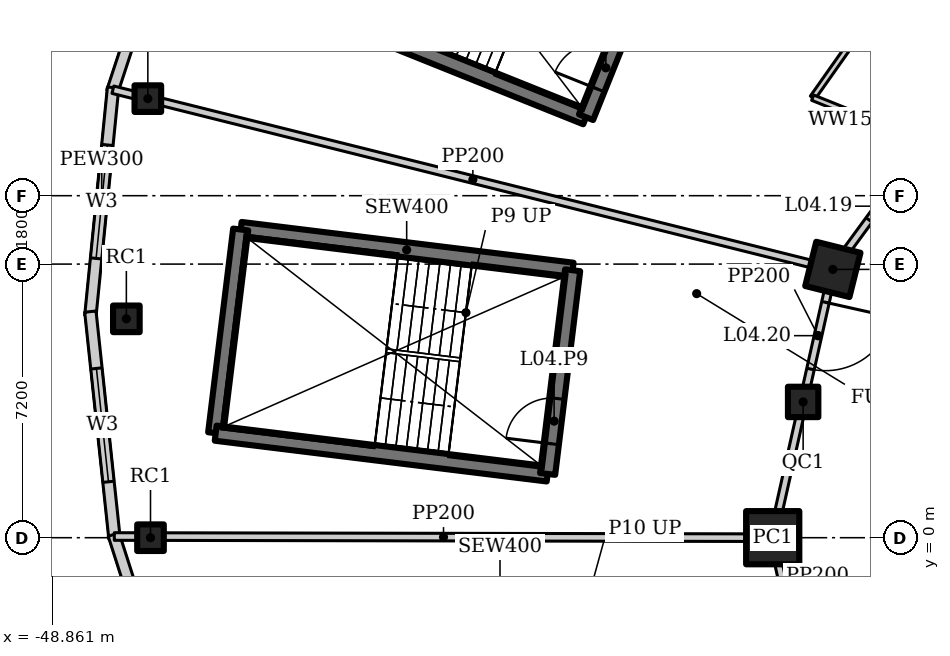
"""IFC4 building model, lengths in metres.
Left out: names, types, materials, properties, quantities, classifications, styles, units other than length and angle.
Written with IfcOpenShell. Run it as: python <this file> out.ifc"""

import sys

from ifc_helpers import new_model, si_unit, direction, frame, frame_2d, origin, origin_2d, place, context, subcontext, project, spatial, rectangle, hollow_rectangle, extrude, element, fill, save


model = new_model("IFC4")
c1 = context("Model", 3, precision=1e-05, world=origin(), true_north=direction((0.0, 1.0)))
c2 = subcontext(c1, "Body", "Model", "MODEL_VIEW")
j1 = project(units=[si_unit("LENGTHUNIT", "METRE"), si_unit("PLANEANGLEUNIT", "RADIAN")], contexts=[c1])
p1 = place(None, origin())
s1 = spatial("IfcSite", under=j1, at=p1, CompositionType="ELEMENT")
p2 = place(p1, origin())
s2 = spatial("IfcBuilding", under=s1, at=p2, CompositionType="ELEMENT")
p3 = place(p2, frame((0.0, 0.0, 27.0)))
s3 = spatial("IfcBuildingStorey", under=s2, at=p3, CompositionType="ELEMENT", Elevation=27.0)
p4 = place(p3, frame((-28.318, 7.06, 0.0), z_axis=(0.0, 0.0, 1.0), x_axis=(0.2419218956, 0.970295726276, 0.0)))
e1 = element("IfcColumn", 1, at=p4, inside=s3, PredefinedType="COLUMN", context=c2, shape_type="SweptSolid", body=[
    extrude(hollow_rectangle(XDim=1.2, YDim=1.2, WallThickness=0.1, at=origin_2d()), origin(), (0.0, 0.0, 1.0), 5.0),
])
p5 = place(p3, frame((-29.9, 0.0, 0.0), z_axis=(0.0, 0.0, 1.0), x_axis=(1.0, 0.0, 0.0)))
e2 = element("IfcColumn", 2, at=p5, inside=s3, PredefinedType="COLUMN", context=c2, shape_type="SweptSolid", body=[
    extrude(hollow_rectangle(XDim=1.4, YDim=1.4, WallThickness=0.1, at=origin_2d()), origin(), (0.0, 0.0, 1.0), 5.0),
])
p6 = place(p3, frame((-29.099, 3.573, 0.0), z_axis=(0.0, 0.0, 1.0), x_axis=(1.0, 0.0, 0.0)))
e3 = element("IfcColumn", 3, at=p6, inside=s3, PredefinedType="COLUMN", context=c2, shape_type="SweptSolid", body=[
    extrude(hollow_rectangle(XDim=0.8, YDim=0.8, WallThickness=0.05, at=origin_2d()), origin(), (0.0, 0.0, 1.0), 4.8),
])
for number, where, z_axis, x_axis in (
    (4, (-46.908, 5.76, 0.0), (0.0, 0.0, 1.0), (1.0, 0.0, 0.0)),
    (5, (-46.343, 11.554, 0.0), (0.0, 0.0, 1.0), (1.0, 0.0, 0.0)),
    (6, (-46.272, 0.0, 0.0), (0.0, 0.0, 1.0), (1.0, 0.0, 0.0)),
):
    element("IfcColumn", number, at=place(p3, frame(where, z_axis=z_axis, x_axis=x_axis)), inside=s3, PredefinedType="COLUMN", context=c2, shape_type="SweptSolid", body=[
        extrude(hollow_rectangle(XDim=0.7, YDim=0.7, WallThickness=0.04, at=origin_2d()), origin(), (0.0, 0.0, 1.0), 4.8),
    ])
p7 = place(p3, frame((-45.158, 18.182, 0.0), z_axis=(0.0, 0.0, 1.0), x_axis=(-0.31263149373, -0.94987449125, 0.0)))
e7 = element("IfcWall", 7, at=p7, inside=s3, PredefinedType="SOLIDWALL", context=c2, shape_type="SweptSolid", body=[
    extrude(rectangle(XDim=6.786, YDim=0.3, at=frame_2d((3.393, 0.0))), origin(), (0.0, 0.0, 1.0), 4.8),
])
p8 = place(p7, frame((1.893, 0.0, 0.9)))
e8 = element("IfcOpeningElement", 8, at=p8, cuts=e7, PredefinedType="OPENING", context=c2, shape_type="SweptSolid", body=[
    extrude(rectangle(XDim=3.0, YDim=2.0, at=frame_2d((1.5, 1.0))), frame((0.0, 0.16, 0.0), z_axis=(0.0, -1.0, 0.0), x_axis=(1.0, 0.0, 0.0)), (0.0, 0.0, 1.0), 0.32),
])
p9 = place(p3, frame((-47.257, 11.845, 0.0), z_axis=(0.0, 0.0, 1.0), x_axis=(-0.099051198898, -0.9950823383, 0.0)))
e9 = element("IfcWall", 9, at=p9, inside=s3, PredefinedType="SOLIDWALL", context=c2, shape_type="SweptSolid", body=[
    extrude(rectangle(XDim=6.036, YDim=0.3, at=frame_2d((3.018, 0.0))), origin(), (0.0, 0.0, 1.0), 4.8),
])
p10 = place(p9, frame((1.518, 0.0, 0.9)))
e10 = element("IfcOpeningElement", 10, at=p10, cuts=e9, PredefinedType="OPENING", context=c2, shape_type="SweptSolid", body=[
    extrude(rectangle(XDim=3.0, YDim=2.0, at=frame_2d((1.5, 1.0))), frame((0.0, 0.16, 0.0), z_axis=(0.0, -1.0, 0.0), x_axis=(1.0, 0.0, 0.0)), (0.0, 0.0, 1.0), 0.32),
])
p11 = place(p3, frame((-47.855, 5.949, 0.0), z_axis=(0.0, 0.0, 1.0), x_axis=(0.105835648981, -0.99438363593, 0.0)))
e11 = element("IfcWall", 11, at=p11, inside=s3, PredefinedType="SOLIDWALL", context=c2, shape_type="SweptSolid", body=[
    extrude(rectangle(XDim=6.007, YDim=0.3, at=frame_2d((3.003, 0.0))), origin(), (0.0, 0.0, 1.0), 4.8),
])
p12 = place(p11, frame((1.503, 0.0, 0.9)))
e12 = element("IfcOpeningElement", 12, at=p12, cuts=e11, PredefinedType="OPENING", context=c2, shape_type="SweptSolid", body=[
    extrude(rectangle(XDim=3.0, YDim=2.0, at=frame_2d((1.5, 1.0))), frame((0.0, 0.16, 0.0), z_axis=(0.0, -1.0, 0.0), x_axis=(1.0, 0.0, 0.0)), (0.0, 0.0, 1.0), 0.32),
])
p13 = place(p3, frame((-47.242, 0.084, 0.0), z_axis=(0.0, 0.0, 1.0), x_axis=(0.304991367091, -0.95235511549, 0.0)))
e13 = element("IfcWall", 13, at=p13, inside=s3, PredefinedType="SOLIDWALL", context=c2, shape_type="SweptSolid", body=[
    extrude(rectangle(XDim=5.956, YDim=0.3, at=frame_2d((2.978, 0.0))), origin(), (0.0, 0.0, 1.0), 4.8),
])
p14 = place(p13, frame((1.478, 0.0, 0.9)))
e14 = element("IfcOpeningElement", 14, at=p14, cuts=e13, PredefinedType="OPENING", context=c2, shape_type="SweptSolid", body=[
    extrude(rectangle(XDim=3.0, YDim=2.0, at=frame_2d((1.5, 1.0))), frame((0.0, 0.16, 0.0), z_axis=(0.0, -1.0, 0.0), x_axis=(1.0, 0.0, 0.0)), (0.0, 0.0, 1.0), 0.32),
])
p15 = place(p3, frame((-25.878, 10.388, 0.0), z_axis=(0.0, 0.0, 1.0), x_axis=(-0.591255937291, -0.806483984105, 0.0)))
e15 = element("IfcWall", 15, at=p15, inside=s3, PredefinedType="SOLIDWALL", context=c2, shape_type="SweptSolid", body=[
    extrude(rectangle(XDim=4.127, YDim=0.2, at=frame_2d((2.063, 0.0))), origin(), (0.0, 0.0, 1.0), 4.394),
])
p16 = place(p15, frame((1.613, 0.0, 0.0)))
e16 = element("IfcOpeningElement", 16, at=p16, cuts=e15, PredefinedType="OPENING", context=c2, shape_type="SweptSolid", body=[
    extrude(rectangle(XDim=0.9, YDim=2.1, at=frame_2d((0.45, 1.05))), frame((0.0, 0.11, 0.0), z_axis=(0.0, -1.0, 0.0), x_axis=(1.0, 0.0, 0.0)), (0.0, 0.0, 1.0), 0.22),
])
p17 = place(p3, frame((-28.318, 7.06, 0.0), z_axis=(0.0, 0.0, 1.0), x_axis=(-0.218673326171, -0.97579812278, 0.0)))
e17 = element("IfcWall", 17, at=p17, inside=s3, PredefinedType="SOLIDWALL", context=c2, shape_type="SweptSolid", body=[
    extrude(rectangle(XDim=3.574, YDim=0.2, at=frame_2d((1.787, 0.0))), origin(), (0.0, 0.0, 1.0), 4.394),
])
p18 = place(p17, frame((0.887, 0.0, 0.0)))
e18 = element("IfcOpeningElement", 18, at=p18, cuts=e17, PredefinedType="OPENING", context=c2, shape_type="SweptSolid", body=[
    extrude(rectangle(XDim=1.8, YDim=2.4, at=frame_2d((0.9, 1.2))), frame((0.0, 0.11, 0.0), z_axis=(0.0, -1.0, 0.0), x_axis=(1.0, 0.0, 0.0)), (0.0, 0.0, 1.0), 0.22),
])
p19 = place(p3, frame((-29.099, 3.573, 0.0), z_axis=(0.0, 0.0, 1.0), x_axis=(-0.218631550323, -0.975807483679, 0.0)))
e19 = element("IfcWall", 19, at=p19, inside=s3, PredefinedType="SOLIDWALL", context=c2, shape_type="SweptSolid", body=[
    extrude(rectangle(XDim=3.662, YDim=0.2, at=frame_2d((1.831, 0.0))), origin(), (0.0, 0.0, 1.0), 4.272),
])
p20 = place(p3, frame((-29.9, 0.0, 0.0), z_axis=(0.0, 0.0, 1.0), x_axis=(0.218631550323, -0.975807483679, 0.0)))
e20 = element("IfcWall", 20, at=p20, inside=s3, PredefinedType="SOLIDWALL", context=c2, shape_type="SweptSolid", body=[
    extrude(rectangle(XDim=3.662, YDim=0.2, at=frame_2d((1.831, 0.0))), origin(), (0.0, 0.0, 1.0), 4.394),
])
p21 = place(p3, frame((-28.318, 7.06, 0.0), z_axis=(0.0, 0.0, 1.0), x_axis=(-0.970227758662, 0.242194335859, 0.0)))
e21 = element("IfcWall", 21, at=p21, inside=s3, PredefinedType="SOLIDWALL", context=c2, shape_type="SweptSolid", body=[
    extrude(rectangle(XDim=19.526, YDim=0.2, at=frame_2d((9.763, 0.0))), origin(), (0.0, 0.0, 1.0), 2.8),
])
p22 = place(p3, frame((-29.9, 0.0, 0.0), z_axis=(0.0, 0.0, 1.0), x_axis=(-0.99999837328, 0.001803728535, 0.0)))
e22 = element("IfcWall", 22, at=p22, inside=s3, PredefinedType="SOLIDWALL", context=c2, shape_type="SweptSolid", body=[
    extrude(rectangle(XDim=17.325, YDim=0.2, at=frame_2d((8.663, 0.0))), origin(), (0.0, 0.0, 1.0), 2.8),
])
p23 = place(p3, frame((-26.385, 15.073, 0.0), z_axis=(0.0, 0.0, 1.0), x_axis=(-0.576153892924, -0.81734123331, 0.0)))
e23 = element("IfcWall", 23, at=p23, inside=s3, PredefinedType="SOLIDWALL", context=c2, shape_type="SweptSolid", body=[
    extrude(rectangle(XDim=4.275, YDim=0.15, at=frame_2d((2.137, 0.0))), origin(), (0.0, 0.0, 1.0), 4.8),
])
p24 = place(p3, frame((-25.878, 10.388, 0.0), z_axis=(0.0, 0.0, 1.0), x_axis=(-0.928160641083, 0.372179827966, 0.0)))
e24 = element("IfcWall", 24, at=p24, inside=s3, PredefinedType="SOLIDWALL", context=c2, shape_type="SweptSolid", body=[
    extrude(rectangle(XDim=3.2, YDim=0.15, at=frame_2d((1.6, 0.0))), origin(), (0.0, 0.0, 1.0), 4.8),
])
p25 = place(p3, frame((-42.978, 14.344, 0.0), z_axis=(0.0, 0.0, 1.0), x_axis=(0.92801678004, -0.372538395288, 0.0)))
e25 = element("IfcWall", 25, at=p25, inside=s3, PredefinedType="SHEAR", context=c2, shape_type="SweptSolid", body=[
    extrude(rectangle(XDim=8.8, YDim=0.4, at=frame_2d((4.4, 0.0))), origin(), (0.0, 0.0, 1.0), 5.0),
])
p26 = place(p3, frame((-34.812, 11.065, 0.0), z_axis=(0.0, 0.0, 1.0), x_axis=(0.372544066459, 0.928014503414, 0.0)))
e26 = element("IfcWall", 26, at=p26, inside=s3, PredefinedType="SHEAR", context=c2, shape_type="SweptSolid", body=[
    extrude(rectangle(XDim=5.4, YDim=0.4, at=frame_2d((2.7, 0.0))), origin(), (0.0, 0.0, 1.0), 5.0),
])
p27 = place(p26, frame((0.8, 0.0, 0.0)))
e27 = element("IfcOpeningElement", 27, at=p27, cuts=e26, PredefinedType="OPENING", context=c2, shape_type="SweptSolid", body=[
    extrude(rectangle(XDim=1.2, YDim=2.1, at=frame_2d((0.6, 1.05))), frame((0.0, 0.21, 0.0), z_axis=(0.0, -1.0, 0.0), x_axis=(1.0, 0.0, 0.0)), (0.0, 0.0, 1.0), 0.42),
])
p28 = place(p3, frame((-35.165, 7.038, 0.0), z_axis=(0.0, 0.0, 1.0), x_axis=(-0.992545280606, 0.121876437212, 0.0)))
e28 = element("IfcWall", 28, at=p28, inside=s3, PredefinedType="SHEAR", context=c2, shape_type="SweptSolid", body=[
    extrude(rectangle(XDim=8.8, YDim=0.4, at=frame_2d((4.4, 0.0))), origin(), (0.0, 0.0, 1.0), 5.0),
])
p29 = place(p3, frame((-43.899, 8.11, 0.0), z_axis=(0.0, 0.0, 1.0), x_axis=(-0.12184754212, -0.99254882826, 0.0)))
e29 = element("IfcWall", 29, at=p29, inside=s3, PredefinedType="SHEAR", context=c2, shape_type="SweptSolid", body=[
    extrude(rectangle(XDim=5.4, YDim=0.4, at=frame_2d((2.7, 0.0))), origin(), (0.0, 0.0, 1.0), 5.0),
])
p30 = place(p3, frame((-44.557, 2.751, 0.0), z_axis=(0.0, 0.0, 1.0), x_axis=(0.992545280606, -0.121876437212, 0.0)))
e30 = element("IfcWall", 30, at=p30, inside=s3, PredefinedType="SHEAR", context=c2, shape_type="SweptSolid", body=[
    extrude(rectangle(XDim=8.8, YDim=0.4, at=frame_2d((4.4, 0.0))), origin(), (0.0, 0.0, 1.0), 5.0),
])
p31 = place(p3, frame((-35.823, 1.678, 0.0), z_axis=(0.0, 0.0, 1.0), x_axis=(0.12184754212, 0.99254882826, 0.0)))
e31 = element("IfcWall", 31, at=p31, inside=s3, PredefinedType="SHEAR", context=c2, shape_type="SweptSolid", body=[
    extrude(rectangle(XDim=5.4, YDim=0.4, at=frame_2d((2.7, 0.0))), origin(), (0.0, 0.0, 1.0), 5.0),
])
p32 = place(p31, frame((0.8, 0.0, 0.0)))
e32 = element("IfcOpeningElement", 32, at=p32, cuts=e31, PredefinedType="OPENING", context=c2, shape_type="SweptSolid", body=[
    extrude(rectangle(XDim=1.2, YDim=2.1, at=frame_2d((0.6, 1.05))), frame((0.0, 0.21, 0.0), z_axis=(0.0, -1.0, 0.0), x_axis=(1.0, 0.0, 0.0)), (0.0, 0.0, 1.0), 0.42),
])
p33 = place(p10, origin())
e33 = element("IfcWindow", 33, at=p33, inside=s3, PartitioningType="SINGLE_PANEL", PredefinedType="WINDOW", context=c2, shape_type="SweptSolid", body=[
    extrude(rectangle(XDim=3.0, YDim=2.0, at=frame_2d((1.5, 1.0))), frame((0.0, 0.03, 0.0), z_axis=(0.0, -1.0, 0.0), x_axis=(1.0, 0.0, 0.0)), (0.0, 0.0, 1.0), 0.06),
])
fill(e10, e33)
p34 = place(p12, origin())
e34 = element("IfcWindow", 34, at=p34, inside=s3, PartitioningType="SINGLE_PANEL", PredefinedType="WINDOW", context=c2, shape_type="SweptSolid", body=[
    extrude(rectangle(XDim=3.0, YDim=2.0, at=frame_2d((1.5, 1.0))), frame((0.0, 0.03, 0.0), z_axis=(0.0, -1.0, 0.0), x_axis=(1.0, 0.0, 0.0)), (0.0, 0.0, 1.0), 0.06),
])
fill(e12, e34)
p35 = place(p16, origin())
e35 = element("IfcDoor", 35, at=p35, inside=s3, OperationType="SINGLE_SWING_LEFT", PredefinedType="DOOR", context=c2, shape_type="SweptSolid", body=[
    extrude(rectangle(XDim=0.9, YDim=2.1, at=frame_2d((0.45, 1.05))), frame((0.0, 0.025, 0.0), z_axis=(0.0, -1.0, 0.0), x_axis=(1.0, 0.0, 0.0)), (0.0, 0.0, 1.0), 0.05),
])
fill(e16, e35)
p36 = place(p18, origin())
e36 = element("IfcDoor", 36, at=p36, inside=s3, OperationType="DOUBLE_DOOR_DOUBLE_SWING", PredefinedType="DOOR", context=c2, shape_type="SweptSolid", body=[
    extrude(rectangle(XDim=1.8, YDim=2.4, at=frame_2d((0.9, 1.2))), frame((0.0, 0.025, 0.0), z_axis=(0.0, -1.0, 0.0), x_axis=(1.0, 0.0, 0.0)), (0.0, 0.0, 1.0), 0.05),
])
fill(e18, e36)
p37 = place(p27, origin())
e37 = element("IfcDoor", 37, at=p37, inside=s3, OperationType="SINGLE_SWING_RIGHT", PredefinedType="DOOR", context=c2, shape_type="SweptSolid", body=[
    extrude(rectangle(XDim=1.2, YDim=2.1, at=frame_2d((0.6, 1.05))), frame((0.0, 0.025, 0.0), z_axis=(0.0, -1.0, 0.0), x_axis=(1.0, 0.0, 0.0)), (0.0, 0.0, 1.0), 0.05),
])
fill(e27, e37)
p38 = place(p32, origin())
e38 = element("IfcDoor", 38, at=p38, inside=s3, OperationType="SINGLE_SWING_RIGHT", PredefinedType="DOOR", context=c2, shape_type="SweptSolid", body=[
    extrude(rectangle(XDim=1.2, YDim=2.1, at=frame_2d((0.6, 1.05))), frame((0.0, 0.025, 0.0), z_axis=(0.0, -1.0, 0.0), x_axis=(1.0, 0.0, 0.0)), (0.0, 0.0, 1.0), 0.05),
])
fill(e32, e38)
save(model, sys.argv[1])
